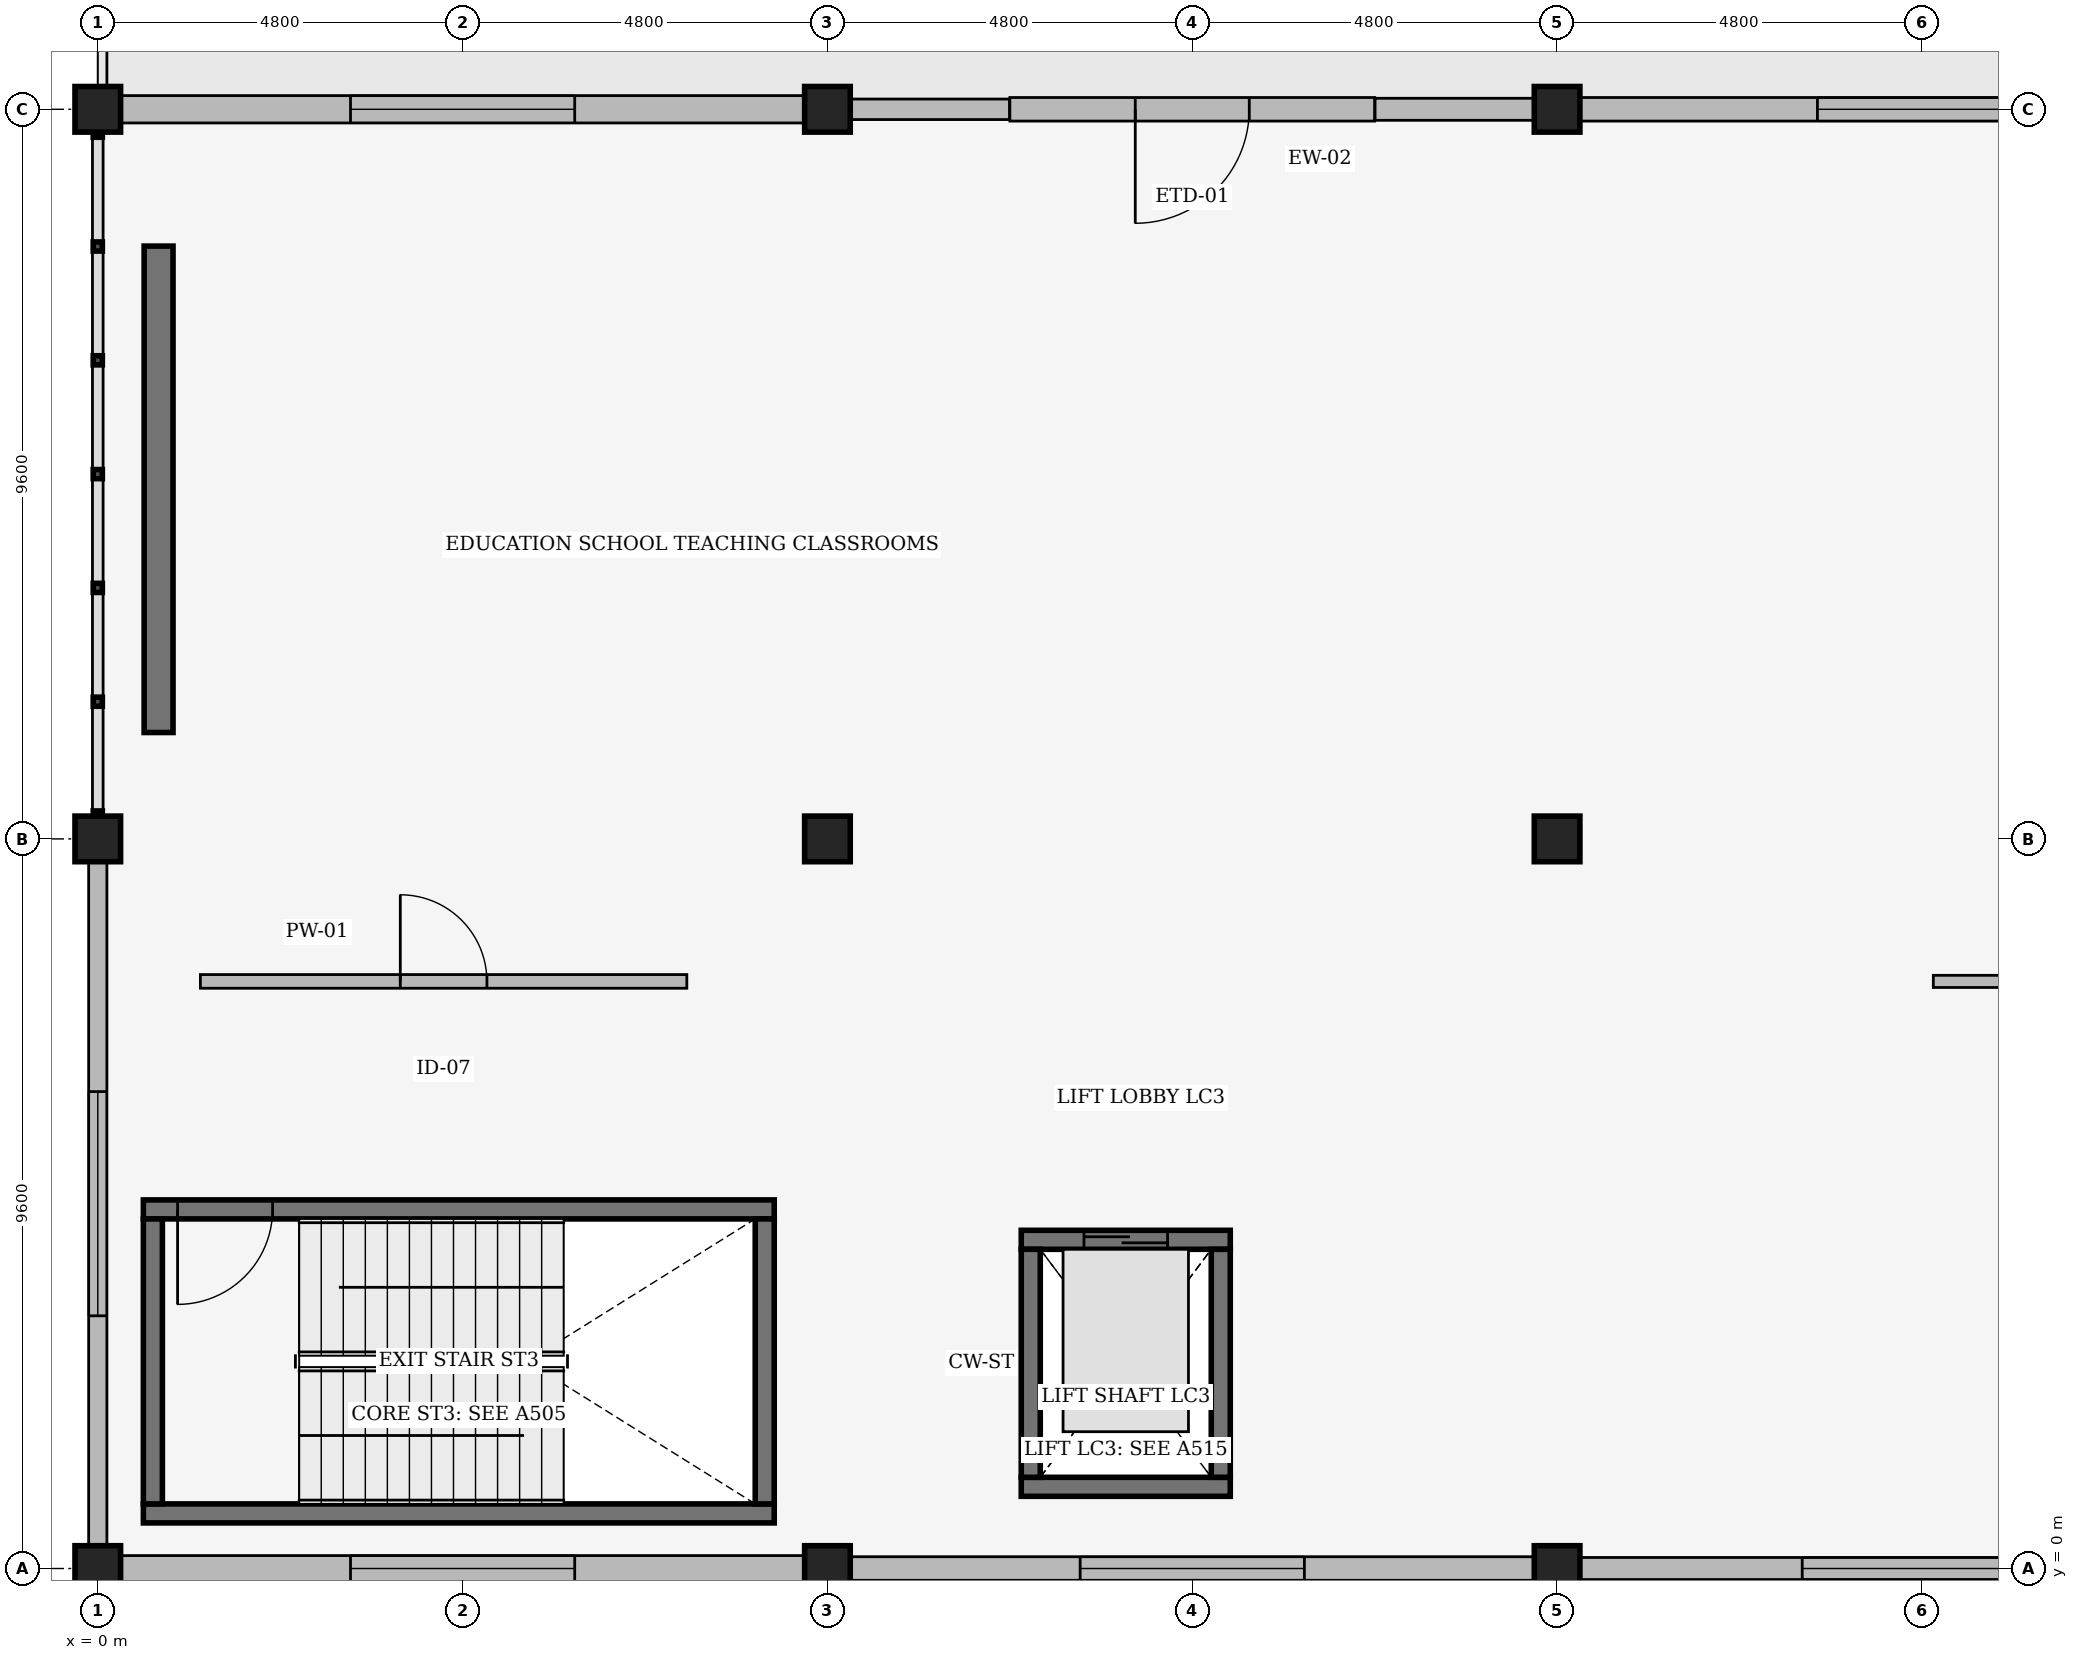
"""IFC4 building model, lengths in metres.
Left out: names, types, materials, properties, quantities, classifications, styles, units other than length and angle.
Written with IfcOpenShell. Run it as: python <this file> out.ifc"""

import sys

from ifc_helpers import new_model, si_unit, direction, frame, frame_2d, origin, origin_2d, place, context, subcontext, project, spatial, rectangle, extrude, element, fill, save


model = new_model("IFC4")
c1 = context("Model", 3, precision=1e-05, world=origin(), true_north=direction((0.0, 1.0)))
c2 = subcontext(c1, "Body", "Model", "MODEL_VIEW")
j1 = project(units=[si_unit("LENGTHUNIT", "METRE"), si_unit("PLANEANGLEUNIT", "RADIAN")], contexts=[c1])
p1 = place(None, origin())
s1 = spatial("IfcSite", under=j1, at=p1, CompositionType="ELEMENT")
p2 = place(p1, origin())
s2 = spatial("IfcBuilding", under=s1, at=p2, CompositionType="ELEMENT")
p3 = place(p2, frame((0.0, 0.0, 10.5)))
s3 = spatial("IfcBuildingStorey", under=s2, at=p3, CompositionType="ELEMENT", Elevation=10.5)
for number, where, z_axis, x_axis in (
    (1, (0.0, 0.0, 0.0), (0.0, 0.0, 1.0), (1.0, 0.0, 0.0)),
    (2, (0.0, 9.6, 0.0), (0.0, 0.0, 1.0), (1.0, 0.0, 0.0)),
    (3, (0.0, 19.2, 0.0), (0.0, 0.0, 1.0), (1.0, 0.0, 0.0)),
    (4, (9.6, 0.0, 0.0), (0.0, 0.0, 1.0), (1.0, 0.0, 0.0)),
    (5, (9.6, 9.6, 0.0), (0.0, 0.0, 1.0), (1.0, 0.0, 0.0)),
    (6, (9.6, 19.2, 0.0), (0.0, 0.0, 1.0), (1.0, 0.0, 0.0)),
    (7, (19.2, 0.0, 0.0), (0.0, 0.0, 1.0), (1.0, 0.0, 0.0)),
    (8, (19.2, 9.6, 0.0), (0.0, 0.0, 1.0), (1.0, 0.0, 0.0)),
    (9, (19.2, 19.2, 0.0), (0.0, 0.0, 1.0), (1.0, 0.0, 0.0)),
):
    element("IfcColumn", number, at=place(p3, frame(where, z_axis=z_axis, x_axis=x_axis)), inside=s3, PredefinedType="COLUMN", context=c2, shape_type="SweptSolid", body=[
        extrude(rectangle(XDim=0.6, YDim=0.6, at=origin_2d()), origin(), (0.0, 0.0, 1.0), 4.8),
    ])
p4 = place(p3, frame((0.8, 11.0, 0.0), z_axis=(0.0, 0.0, 1.0), x_axis=(0.0, 1.0, 0.0)))
e10 = element("IfcWall", 10, at=p4, inside=s3, PredefinedType="SHEAR", context=c2, shape_type="SweptSolid", body=[
    extrude(rectangle(XDim=6.4, YDim=0.38, at=frame_2d((3.2, 0.0))), origin(), (0.0, 0.0, 1.0), 4.8),
])
p5 = place(p3, frame((16.8, 19.2, 0.0), z_axis=(0.0, 0.0, 1.0), x_axis=(-1.0, 0.0, 0.0)))
e11 = element("IfcWall", 11, at=p5, inside=s3, PredefinedType="SOLIDWALL", context=c2, shape_type="SweptSolid", body=[
    extrude(rectangle(XDim=4.8, YDim=0.31, at=frame_2d((2.4, 0.0))), origin(), (0.0, 0.0, 1.0), 4.283),
])
p6 = place(p5, frame((3.15, 0.0, 0.0), z_axis=(0.0, 0.0, 1.0), x_axis=(-1.0, 0.0, 0.0)))
e12 = element("IfcOpeningElement", 12, at=p6, cuts=e11, PredefinedType="OPENING", context=c2, shape_type="SweptSolid", body=[
    extrude(rectangle(XDim=1.5, YDim=2.25, at=frame_2d((0.75, 1.125))), frame((0.0, 0.165, 0.0), z_axis=(0.0, -1.0, 0.0), x_axis=(1.0, 0.0, 0.0)), (0.0, 0.0, 1.0), 0.33),
])
p7 = place(p3, frame((28.492, 19.2, 0.0), z_axis=(0.0, 0.0, 1.0), x_axis=(-1.0, 0.0, 0.0)))
e13 = element("IfcWall", 13, at=p7, inside=s3, PredefinedType="SOLIDWALL", context=c2, shape_type="SweptSolid", body=[
    extrude(rectangle(XDim=8.984, YDim=0.31, at=frame_2d((4.492, 0.0))), origin(), (0.0, 0.0, 1.0), 3.875),
])
p8 = place(p7, frame((3.117, 0.0, 0.95)))
e14 = element("IfcOpeningElement", 14, at=p8, cuts=e13, PredefinedType="OPENING", context=c2, shape_type="SweptSolid", body=[
    extrude(rectangle(XDim=2.75, YDim=2.1, at=frame_2d((1.375, 1.05))), frame((0.0, 0.165, 0.0), z_axis=(0.0, -1.0, 0.0), x_axis=(1.0, 0.0, 0.0)), (0.0, 0.0, 1.0), 0.33),
])
p9 = place(p3, frame((18.892, 19.2, 0.0), z_axis=(0.0, 0.0, 1.0), x_axis=(-1.0, 0.0, 0.0)))
e15 = element("IfcWall", 15, at=p9, inside=s3, PredefinedType="SOLIDWALL", context=c2, shape_type="SweptSolid", body=[
    extrude(rectangle(XDim=2.087, YDim=0.29, at=frame_2d((1.043, 0.0))), origin(), (0.0, 0.0, 1.0), 3.875),
])
p10 = place(p3, frame((11.995, 19.2, 0.0), z_axis=(0.0, 0.0, 1.0), x_axis=(-1.0, 0.0, 0.0)))
e16 = element("IfcWall", 16, at=p10, inside=s3, PredefinedType="SOLIDWALL", context=c2, shape_type="SweptSolid", body=[
    extrude(rectangle(XDim=2.087, YDim=0.27, at=frame_2d((1.043, 0.0))), origin(), (0.0, 0.0, 1.0), 4.283),
])
p11 = place(p3, frame((9.292, 19.2, 0.0), z_axis=(0.0, 0.0, 1.0), x_axis=(-1.0, 0.0, 0.0)))
e17 = element("IfcWall", 17, at=p11, inside=s3, PredefinedType="SOLIDWALL", context=c2, shape_type="SweptSolid", body=[
    extrude(rectangle(XDim=8.984, YDim=0.36, at=frame_2d((4.492, 0.0))), origin(), (0.0, 0.0, 1.0), 4.178),
])
p12 = place(p11, frame((3.017, 0.0, 0.95)))
e18 = element("IfcOpeningElement", 18, at=p12, cuts=e17, PredefinedType="OPENING", context=c2, shape_type="SweptSolid", body=[
    extrude(rectangle(XDim=2.95, YDim=1.2, at=frame_2d((1.475, 0.6))), frame((0.0, 0.19, 0.0), z_axis=(0.0, -1.0, 0.0), x_axis=(1.0, 0.0, 0.0)), (0.0, 0.0, 1.0), 0.38),
])
p13 = place(p3, frame((0.0, 9.292, 0.0), z_axis=(0.0, 0.0, 1.0), x_axis=(0.0, -1.0, 0.0)))
e19 = element("IfcWall", 19, at=p13, inside=s3, PredefinedType="SOLIDWALL", context=c2, shape_type="SweptSolid", body=[
    extrude(rectangle(XDim=8.984, YDim=0.24, at=frame_2d((4.492, 0.0))), origin(), (0.0, 0.0, 1.0), 3.874),
])
p14 = place(p13, frame((3.017, 0.0, 0.95)))
e20 = element("IfcOpeningElement", 20, at=p14, cuts=e19, PredefinedType="OPENING", context=c2, shape_type="SweptSolid", body=[
    extrude(rectangle(XDim=2.95, YDim=1.5, at=frame_2d((1.475, 0.75))), frame((0.0, 0.13, 0.0), z_axis=(0.0, -1.0, 0.0), x_axis=(1.0, 0.0, 0.0)), (0.0, 0.0, 1.0), 0.26),
])
p15 = place(p3, frame((0.308, 0.0, 0.0), z_axis=(0.0, 0.0, 1.0), x_axis=(1.0, 0.0, 0.0)))
e21 = element("IfcWall", 21, at=p15, inside=s3, PredefinedType="SOLIDWALL", context=c2, shape_type="SweptSolid", body=[
    extrude(rectangle(XDim=8.984, YDim=0.34, at=frame_2d((4.492, 0.0))), origin(), (0.0, 0.0, 1.0), 3.875),
])
p16 = place(p15, frame((3.017, 0.0, 0.95)))
e22 = element("IfcOpeningElement", 22, at=p16, cuts=e21, PredefinedType="OPENING", context=c2, shape_type="SweptSolid", body=[
    extrude(rectangle(XDim=2.95, YDim=1.8, at=frame_2d((1.475, 0.9))), frame((0.0, 0.18, 0.0), z_axis=(0.0, -1.0, 0.0), x_axis=(1.0, 0.0, 0.0)), (0.0, 0.0, 1.0), 0.36),
])
p17 = place(p3, frame((9.908, 0.0, 0.0), z_axis=(0.0, 0.0, 1.0), x_axis=(1.0, 0.0, 0.0)))
e23 = element("IfcWall", 23, at=p17, inside=s3, PredefinedType="SOLIDWALL", context=c2, shape_type="SweptSolid", body=[
    extrude(rectangle(XDim=8.984, YDim=0.31, at=frame_2d((4.492, 0.0))), origin(), (0.0, 0.0, 1.0), 3.875),
])
p18 = place(p17, frame((3.017, 0.0, 0.95)))
e24 = element("IfcOpeningElement", 24, at=p18, cuts=e23, PredefinedType="OPENING", context=c2, shape_type="SweptSolid", body=[
    extrude(rectangle(XDim=2.95, YDim=2.1, at=frame_2d((1.475, 1.05))), frame((0.0, 0.165, 0.0), z_axis=(0.0, -1.0, 0.0), x_axis=(1.0, 0.0, 0.0)), (0.0, 0.0, 1.0), 0.33),
])
p19 = place(p3, frame((19.508, 0.0, 0.0), z_axis=(0.0, 0.0, 1.0), x_axis=(1.0, 0.0, 0.0)))
e25 = element("IfcWall", 25, at=p19, inside=s3, PredefinedType="SOLIDWALL", context=c2, shape_type="SweptSolid", body=[
    extrude(rectangle(XDim=8.984, YDim=0.29, at=frame_2d((4.492, 0.0))), origin(), (0.0, 0.0, 1.0), 4.178),
])
p20 = place(p19, frame((2.917, 0.0, 0.95)))
e26 = element("IfcOpeningElement", 26, at=p20, cuts=e25, PredefinedType="OPENING", context=c2, shape_type="SweptSolid", body=[
    extrude(rectangle(XDim=3.15, YDim=1.2, at=frame_2d((1.575, 0.6))), frame((0.0, 0.155, 0.0), z_axis=(0.0, -1.0, 0.0), x_axis=(1.0, 0.0, 0.0)), (0.0, 0.0, 1.0), 0.31),
])
p21 = place(p3, frame((0.6, 0.725, 0.0), z_axis=(0.0, 0.0, 1.0), x_axis=(1.0, 0.0, 0.0)))
e27 = element("IfcWall", 27, at=p21, inside=s3, PredefinedType="SHEAR", context=c2, shape_type="SweptSolid", body=[
    extrude(rectangle(XDim=8.3, YDim=0.25, at=frame_2d((4.15, 0.0))), origin(), (0.0, 0.0, 1.0), 4.52),
])
p22 = place(p3, frame((8.9, 4.725, 0.0), z_axis=(0.0, 0.0, 1.0), x_axis=(-1.0, 0.0, 0.0)))
e28 = element("IfcWall", 28, at=p22, inside=s3, PredefinedType="SHEAR", context=c2, shape_type="SweptSolid", body=[
    extrude(rectangle(XDim=8.3, YDim=0.25, at=frame_2d((4.15, 0.0))), origin(), (0.0, 0.0, 1.0), 4.52),
])
p23 = place(p22, frame((7.85, 0.0, 0.0), z_axis=(0.0, 0.0, 1.0), x_axis=(-1.0, 0.0, 0.0)))
e29 = element("IfcOpeningElement", 29, at=p23, cuts=e28, PredefinedType="OPENING", context=c2, shape_type="SweptSolid", body=[
    extrude(rectangle(XDim=1.25, YDim=2.2, at=frame_2d((0.625, 1.1))), frame((0.0, 0.135, 0.0), z_axis=(0.0, -1.0, 0.0), x_axis=(1.0, 0.0, 0.0)), (0.0, 0.0, 1.0), 0.27),
])
for number, where, z_axis, x_axis in (
    (30, (0.725, 4.6, 0.0), (0.0, 0.0, 1.0), (0.0, -1.0, 0.0)),
    (31, (8.775, 0.85, 0.0), (0.0, 0.0, 1.0), (0.0, 1.0, 0.0)),
):
    element("IfcWall", number, at=place(p3, frame(where, z_axis=z_axis, x_axis=x_axis)), inside=s3, PredefinedType="SHEAR", context=c2, shape_type="SweptSolid", body=[
        extrude(rectangle(XDim=3.75, YDim=0.25, at=frame_2d((1.875, 0.0))), origin(), (0.0, 0.0, 1.0), 4.52),
    ])
p24 = place(p3, frame((12.15, 1.075, 0.0), z_axis=(0.0, 0.0, 1.0), x_axis=(1.0, 0.0, 0.0)))
e32 = element("IfcWall", 32, at=p24, inside=s3, PredefinedType="SHEAR", context=c2, shape_type="SweptSolid", body=[
    extrude(rectangle(XDim=2.75, YDim=0.25, at=frame_2d((1.375, 0.0))), origin(), (0.0, 0.0, 1.0), 4.52),
])
p25 = place(p3, frame((12.15, 4.325, 0.0), z_axis=(0.0, 0.0, 1.0), x_axis=(1.0, 0.0, 0.0)))
e33 = element("IfcWall", 33, at=p25, inside=s3, PredefinedType="SHEAR", context=c2, shape_type="SweptSolid", body=[
    extrude(rectangle(XDim=2.75, YDim=0.25, at=frame_2d((1.375, 0.0))), origin(), (0.0, 0.0, 1.0), 4.52),
])
p26 = place(p25, frame((0.825, 0.0, 0.0)))
e34 = element("IfcOpeningElement", 34, at=p26, cuts=e33, PredefinedType="OPENING", context=c2, shape_type="SweptSolid", body=[
    extrude(rectangle(XDim=1.1, YDim=2.2, at=frame_2d((0.55, 1.1))), frame((0.0, 0.135, 0.0), z_axis=(0.0, -1.0, 0.0), x_axis=(1.0, 0.0, 0.0)), (0.0, 0.0, 1.0), 0.27),
])
for number, where, z_axis, x_axis in (
    (35, (12.275, 1.2, 0.0), (0.0, 0.0, 1.0), (0.0, 1.0, 0.0)),
    (36, (14.775, 1.2, 0.0), (0.0, 0.0, 1.0), (0.0, 1.0, 0.0)),
):
    element("IfcWall", number, at=place(p3, frame(where, z_axis=z_axis, x_axis=x_axis)), inside=s3, PredefinedType="SHEAR", context=c2, shape_type="SweptSolid", body=[
        extrude(rectangle(XDim=3.0, YDim=0.25, at=frame_2d((1.5, 0.0))), origin(), (0.0, 0.0, 1.0), 4.52),
    ])
p27 = place(p3, frame((1.35, 7.725, 0.0), z_axis=(0.0, 0.0, 1.0), x_axis=(1.0, 0.0, 0.0)))
e37 = element("IfcWall", 37, at=p27, inside=s3, PredefinedType="PARTITIONING", context=c2, shape_type="SweptSolid", body=[
    extrude(rectangle(XDim=6.4, YDim=0.18, at=frame_2d((3.2, 0.0))), origin(), (0.0, 0.0, 1.0), 4.44),
])
p28 = place(p27, frame((2.63, 0.0, 0.0)))
e38 = element("IfcOpeningElement", 38, at=p28, cuts=e37, PredefinedType="OPENING", context=c2, shape_type="SweptSolid", body=[
    extrude(rectangle(XDim=1.14, YDim=2.22, at=frame_2d((0.57, 1.11))), frame((0.0, 0.1, 0.0), z_axis=(0.0, -1.0, 0.0), x_axis=(1.0, 0.0, 0.0)), (0.0, 0.0, 1.0), 0.2),
])
p29 = place(p3, frame((24.15, 7.725, 0.0), z_axis=(0.0, 0.0, 1.0), x_axis=(1.0, 0.0, 0.0)))
e39 = element("IfcWall", 39, at=p29, inside=s3, PredefinedType="PARTITIONING", context=c2, shape_type="SweptSolid", body=[
    extrude(rectangle(XDim=6.4, YDim=0.16, at=frame_2d((3.2, 0.0))), origin(), (0.0, 0.0, 1.0), 3.942),
])
p30 = place(p29, frame((2.61, 0.0, 0.0)))
e40 = element("IfcOpeningElement", 40, at=p30, cuts=e39, PredefinedType="OPENING", context=c2, shape_type="SweptSolid", body=[
    extrude(rectangle(XDim=1.18, YDim=2.22, at=frame_2d((0.59, 1.11))), frame((0.0, 0.09, 0.0), z_axis=(0.0, -1.0, 0.0), x_axis=(1.0, 0.0, 0.0)), (0.0, 0.0, 1.0), 0.18),
])
p31 = place(p6, origin())
e41 = element("IfcDoor", 41, at=p31, inside=s3, OperationType="SINGLE_SWING_LEFT", PredefinedType="DOOR", context=c2, shape_type="SweptSolid", body=[
    extrude(rectangle(XDim=1.5, YDim=2.25, at=frame_2d((0.75, 1.125))), frame((0.0, 0.025, 0.0), z_axis=(0.0, -1.0, 0.0), x_axis=(1.0, 0.0, 0.0)), (0.0, 0.0, 1.0), 0.05),
])
fill(e12, e41)
p32 = place(p8, origin())
e42 = element("IfcWindow", 42, at=p32, inside=s3, PartitioningType="SINGLE_PANEL", PredefinedType="WINDOW", context=c2, shape_type="SweptSolid", body=[
    extrude(rectangle(XDim=2.75, YDim=2.1, at=frame_2d((1.375, 1.05))), frame((0.0, 0.03, 0.0), z_axis=(0.0, -1.0, 0.0), x_axis=(1.0, 0.0, 0.0)), (0.0, 0.0, 1.0), 0.06),
])
fill(e14, e42)
p33 = place(p12, origin())
e43 = element("IfcWindow", 43, at=p33, inside=s3, PartitioningType="SINGLE_PANEL", PredefinedType="WINDOW", context=c2, shape_type="SweptSolid", body=[
    extrude(rectangle(XDim=2.95, YDim=1.2, at=frame_2d((1.475, 0.6))), frame((0.0, 0.03, 0.0), z_axis=(0.0, -1.0, 0.0), x_axis=(1.0, 0.0, 0.0)), (0.0, 0.0, 1.0), 0.06),
])
fill(e18, e43)
p34 = place(p14, origin())
e44 = element("IfcWindow", 44, at=p34, inside=s3, PartitioningType="SINGLE_PANEL", PredefinedType="WINDOW", context=c2, shape_type="SweptSolid", body=[
    extrude(rectangle(XDim=2.95, YDim=1.5, at=frame_2d((1.475, 0.75))), frame((0.0, 0.03, 0.0), z_axis=(0.0, -1.0, 0.0), x_axis=(1.0, 0.0, 0.0)), (0.0, 0.0, 1.0), 0.06),
])
fill(e20, e44)
p35 = place(p16, origin())
e45 = element("IfcWindow", 45, at=p35, inside=s3, PartitioningType="SINGLE_PANEL", PredefinedType="WINDOW", context=c2, shape_type="SweptSolid", body=[
    extrude(rectangle(XDim=2.95, YDim=1.8, at=frame_2d((1.475, 0.9))), frame((0.0, 0.03, 0.0), z_axis=(0.0, -1.0, 0.0), x_axis=(1.0, 0.0, 0.0)), (0.0, 0.0, 1.0), 0.06),
])
fill(e22, e45)
p36 = place(p18, origin())
e46 = element("IfcWindow", 46, at=p36, inside=s3, PartitioningType="SINGLE_PANEL", PredefinedType="WINDOW", context=c2, shape_type="SweptSolid", body=[
    extrude(rectangle(XDim=2.95, YDim=2.1, at=frame_2d((1.475, 1.05))), frame((0.0, 0.03, 0.0), z_axis=(0.0, -1.0, 0.0), x_axis=(1.0, 0.0, 0.0)), (0.0, 0.0, 1.0), 0.06),
])
fill(e24, e46)
p37 = place(p20, origin())
e47 = element("IfcWindow", 47, at=p37, inside=s3, PartitioningType="SINGLE_PANEL", PredefinedType="WINDOW", context=c2, shape_type="SweptSolid", body=[
    extrude(rectangle(XDim=3.15, YDim=1.2, at=frame_2d((1.575, 0.6))), frame((0.0, 0.03, 0.0), z_axis=(0.0, -1.0, 0.0), x_axis=(1.0, 0.0, 0.0)), (0.0, 0.0, 1.0), 0.06),
])
fill(e26, e47)
p38 = place(p23, origin())
e48 = element("IfcDoor", 48, at=p38, inside=s3, OperationType="SINGLE_SWING_LEFT", PredefinedType="DOOR", context=c2, shape_type="SweptSolid", body=[
    extrude(rectangle(XDim=1.25, YDim=2.2, at=frame_2d((0.625, 1.1))), frame((0.0, 0.025, 0.0), z_axis=(0.0, -1.0, 0.0), x_axis=(1.0, 0.0, 0.0)), (0.0, 0.0, 1.0), 0.05),
])
fill(e29, e48)
p39 = place(p26, origin())
e49 = element("IfcDoor", 49, at=p39, inside=s3, OperationType="DOUBLE_DOOR_SLIDING", PredefinedType="DOOR", context=c2, shape_type="SweptSolid", body=[
    extrude(rectangle(XDim=1.1, YDim=2.2, at=frame_2d((0.55, 1.1))), frame((0.0, 0.025, 0.0), z_axis=(0.0, -1.0, 0.0), x_axis=(1.0, 0.0, 0.0)), (0.0, 0.0, 1.0), 0.05),
])
fill(e34, e49)
p40 = place(p28, origin())
e50 = element("IfcDoor", 50, at=p40, inside=s3, OperationType="SINGLE_SWING_LEFT", PredefinedType="DOOR", context=c2, shape_type="SweptSolid", body=[
    extrude(rectangle(XDim=1.14, YDim=2.22, at=frame_2d((0.57, 1.11))), frame((0.0, 0.025, 0.0), z_axis=(0.0, -1.0, 0.0), x_axis=(1.0, 0.0, 0.0)), (0.0, 0.0, 1.0), 0.05),
])
fill(e38, e50)
save(model, sys.argv[1])
